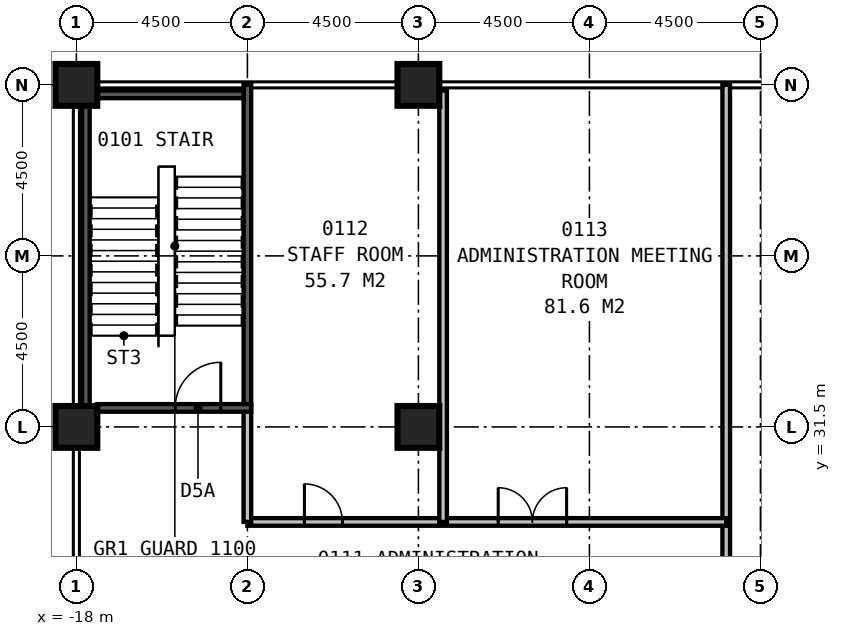
"""IFC4 building model, lengths in metres.
Left out: names, types, materials, properties, quantities, classifications, styles, units other than length and angle.
Written with IfcOpenShell. Run it as: python <this file> out.ifc"""

import sys

from ifc_helpers import new_model, si_unit, direction, frame, frame_2d, origin, origin_2d, place, context, subcontext, project, spatial, rectangle, extrude, element, fill, save


model = new_model("IFC4")
c1 = context("Model", 3, precision=1e-05, world=origin(), true_north=direction((0.0, 1.0)))
c2 = subcontext(c1, "Body", "Model", "MODEL_VIEW")
j1 = project(units=[si_unit("LENGTHUNIT", "METRE"), si_unit("PLANEANGLEUNIT", "RADIAN")], contexts=[c1])
p1 = place(None, origin())
s1 = spatial("IfcSite", under=j1, at=p1, CompositionType="ELEMENT")
p2 = place(p1, origin())
s2 = spatial("IfcBuilding", under=s1, at=p2, CompositionType="ELEMENT")
p3 = place(p2, frame((0.0, 0.0, 6.0)))
s3 = spatial("IfcBuildingStorey", under=s2, at=p3, CompositionType="ELEMENT", Elevation=6.0)
for number, where, z_axis, x_axis in (
    (1, (-18.0, 31.5, 0.0), (0.0, 0.0, 1.0), (1.0, 0.0, 0.0)),
    (2, (-9.0, 31.5, 0.0), (0.0, 0.0, 1.0), (1.0, 0.0, 0.0)),
    (3, (-18.0, 40.5, 0.0), (0.0, 0.0, 1.0), (1.0, 0.0, 0.0)),
    (4, (-9.0, 40.5, 0.0), (0.0, 0.0, 1.0), (1.0, 0.0, 0.0)),
):
    element("IfcColumn", number, at=place(p3, frame(where, z_axis=z_axis, x_axis=x_axis)), inside=s3, PredefinedType="COLUMN", context=c2, shape_type="SweptSolid", body=[
        extrude(rectangle(XDim=1.1, YDim=1.1, at=origin_2d()), origin(), (0.0, 0.0, 1.0), 5.0),
    ])
p4 = place(p3, frame((-17.45, 32.0, 0.0), z_axis=(0.0, 0.0, 1.0), x_axis=(1.0, 0.0, 0.0)))
e5 = element("IfcWall", 5, at=p4, inside=s3, PredefinedType="SOLIDWALL", context=c2, shape_type="SweptSolid", body=[
    extrude(rectangle(XDim=4.05, YDim=0.2, at=frame_2d((2.025, 0.0))), origin(), (0.0, 0.0, 1.0), 3.1),
])
p5 = place(p4, frame((2.05, 0.0, 0.0)))
e6 = element("IfcOpeningElement", 6, at=p5, cuts=e5, PredefinedType="OPENING", context=c2, shape_type="SweptSolid", body=[
    extrude(rectangle(XDim=1.2, YDim=2.1, at=frame_2d((0.6, 1.05))), frame((0.0, 0.11, 0.0), z_axis=(0.0, -1.0, 0.0), x_axis=(1.0, 0.0, 0.0)), (0.0, 0.0, 1.0), 0.22),
])
p6 = place(p3, frame((-13.5, 32.1, 0.0), z_axis=(0.0, 0.0, 1.0), x_axis=(0.0, 1.0, 0.0)))
e7 = element("IfcWall", 7, at=p6, inside=s3, PredefinedType="SOLIDWALL", context=c2, shape_type="SweptSolid", body=[
    extrude(rectangle(XDim=8.4, YDim=0.2, at=frame_2d((4.2, 0.0))), origin(), (0.0, 0.0, 1.0), 4.7),
])
p7 = place(p3, frame((-17.75, 32.05, 0.0), z_axis=(0.0, 0.0, 1.0), x_axis=(0.0, 1.0, 0.0)))
e8 = element("IfcWall", 8, at=p7, inside=s3, PredefinedType="SOLIDWALL", context=c2, shape_type="SweptSolid", body=[
    extrude(rectangle(XDim=7.9, YDim=0.2, at=frame_2d((3.95, 0.0))), origin(), (0.0, 0.0, 1.0), 4.7),
])
p8 = place(p3, frame((-17.45, 40.25, 0.0), z_axis=(0.0, 0.0, 1.0), x_axis=(1.0, 0.0, 0.0)))
e9 = element("IfcWall", 9, at=p8, inside=s3, PredefinedType="SOLIDWALL", context=c2, shape_type="SweptSolid", body=[
    extrude(rectangle(XDim=3.85, YDim=0.2, at=frame_2d((1.925, 0.0))), origin(), (0.0, 0.0, 1.0), 4.7),
])
p9 = place(p3, frame((-0.9, -9.0, 0.0), z_axis=(0.0, 0.0, 1.0), x_axis=(0.0, 1.0, 0.0)))
e10 = element("IfcWall", 10, at=p9, inside=s3, PredefinedType="PARTITIONING", context=c2, shape_type="SweptSolid", body=[
    extrude(rectangle(XDim=49.5, YDim=0.2, at=frame_2d((24.75, 0.0))), origin(), (0.0, 0.0, 1.0), 4.7),
])
p10 = place(p9, frame((10.0, 0.0, 0.0)))
e11 = element("IfcOpeningElement", 11, at=p10, cuts=e10, PredefinedType="OPENING", context=c2, shape_type="SweptSolid", body=[
    extrude(rectangle(XDim=1.8, YDim=2.4, at=frame_2d((0.9, 1.2))), frame((0.0, 0.11, 0.0), z_axis=(0.0, -1.0, 0.0), x_axis=(1.0, 0.0, 0.0)), (0.0, 0.0, 1.0), 0.22),
])
p11 = place(p3, frame((-13.5, 29.0, 0.0), z_axis=(0.0, 0.0, 1.0), x_axis=(1.0, 0.0, 0.0)))
e12 = element("IfcWall", 12, at=p11, inside=s3, PredefinedType="PARTITIONING", context=c2, shape_type="SweptSolid", body=[
    extrude(rectangle(XDim=12.6, YDim=0.2, at=frame_2d((6.3, 0.0))), origin(), (0.0, 0.0, 1.0), 4.7),
])
p12 = place(p11, frame((1.5, 0.0, 0.0)))
e13 = element("IfcOpeningElement", 13, at=p12, cuts=e12, PredefinedType="OPENING", context=c2, shape_type="SweptSolid", body=[
    extrude(rectangle(XDim=1.0, YDim=2.1, at=frame_2d((0.5, 1.05))), frame((0.0, 0.11, 0.0), z_axis=(0.0, -1.0, 0.0), x_axis=(1.0, 0.0, 0.0)), (0.0, 0.0, 1.0), 0.22),
])
p13 = place(p11, frame((6.6, 0.0, 0.0)))
e14 = element("IfcOpeningElement", 14, at=p13, cuts=e12, PredefinedType="OPENING", context=c2, shape_type="SweptSolid", body=[
    extrude(rectangle(XDim=1.8, YDim=2.4, at=frame_2d((0.9, 1.2))), frame((0.0, 0.11, 0.0), z_axis=(0.0, -1.0, 0.0), x_axis=(1.0, 0.0, 0.0)), (0.0, 0.0, 1.0), 0.22),
])
p14 = place(p3, frame((-13.5, 29.0, 0.0), z_axis=(0.0, 0.0, 1.0), x_axis=(0.0, 1.0, 0.0)))
e15 = element("IfcWall", 15, at=p14, inside=s3, PredefinedType="PARTITIONING", context=c2, shape_type="SweptSolid", body=[
    extrude(rectangle(XDim=3.0, YDim=0.2, at=frame_2d((1.5, 0.0))), origin(), (0.0, 0.0, 1.0), 4.7),
])
p15 = place(p3, frame((-8.35, 29.0, 0.0), z_axis=(0.0, 0.0, 1.0), x_axis=(0.0, 1.0, 0.0)))
e16 = element("IfcWall", 16, at=p15, inside=s3, PredefinedType="PARTITIONING", context=c2, shape_type="SweptSolid", body=[
    extrude(rectangle(XDim=11.35, YDim=0.2, at=frame_2d((5.675, 0.0))), origin(), (0.0, 0.0, 1.0), 4.7),
])
p16 = place(p5, origin())
e17 = element("IfcDoor", 17, at=p16, inside=s3, OperationType="SINGLE_SWING_RIGHT", PredefinedType="DOOR", context=c2, shape_type="SweptSolid", body=[
    extrude(rectangle(XDim=1.2, YDim=2.1, at=frame_2d((0.6, 1.05))), frame((0.0, 0.025, 0.0), z_axis=(0.0, -1.0, 0.0), x_axis=(1.0, 0.0, 0.0)), (0.0, 0.0, 1.0), 0.05),
])
fill(e6, e17)
p17 = place(p12, origin())
e18 = element("IfcDoor", 18, at=p17, inside=s3, OperationType="SINGLE_SWING_LEFT", PredefinedType="DOOR", context=c2, shape_type="SweptSolid", body=[
    extrude(rectangle(XDim=1.0, YDim=2.1, at=frame_2d((0.5, 1.05))), frame((0.0, 0.025, 0.0), z_axis=(0.0, -1.0, 0.0), x_axis=(1.0, 0.0, 0.0)), (0.0, 0.0, 1.0), 0.05),
])
fill(e13, e18)
p18 = place(p13, origin())
e19 = element("IfcDoor", 19, at=p18, inside=s3, OperationType="DOUBLE_DOOR_SINGLE_SWING", PredefinedType="DOOR", context=c2, shape_type="SweptSolid", body=[
    extrude(rectangle(XDim=1.8, YDim=2.4, at=frame_2d((0.9, 1.2))), frame((0.0, 0.025, 0.0), z_axis=(0.0, -1.0, 0.0), x_axis=(1.0, 0.0, 0.0)), (0.0, 0.0, 1.0), 0.05),
])
fill(e14, e19)
save(model, sys.argv[1])
